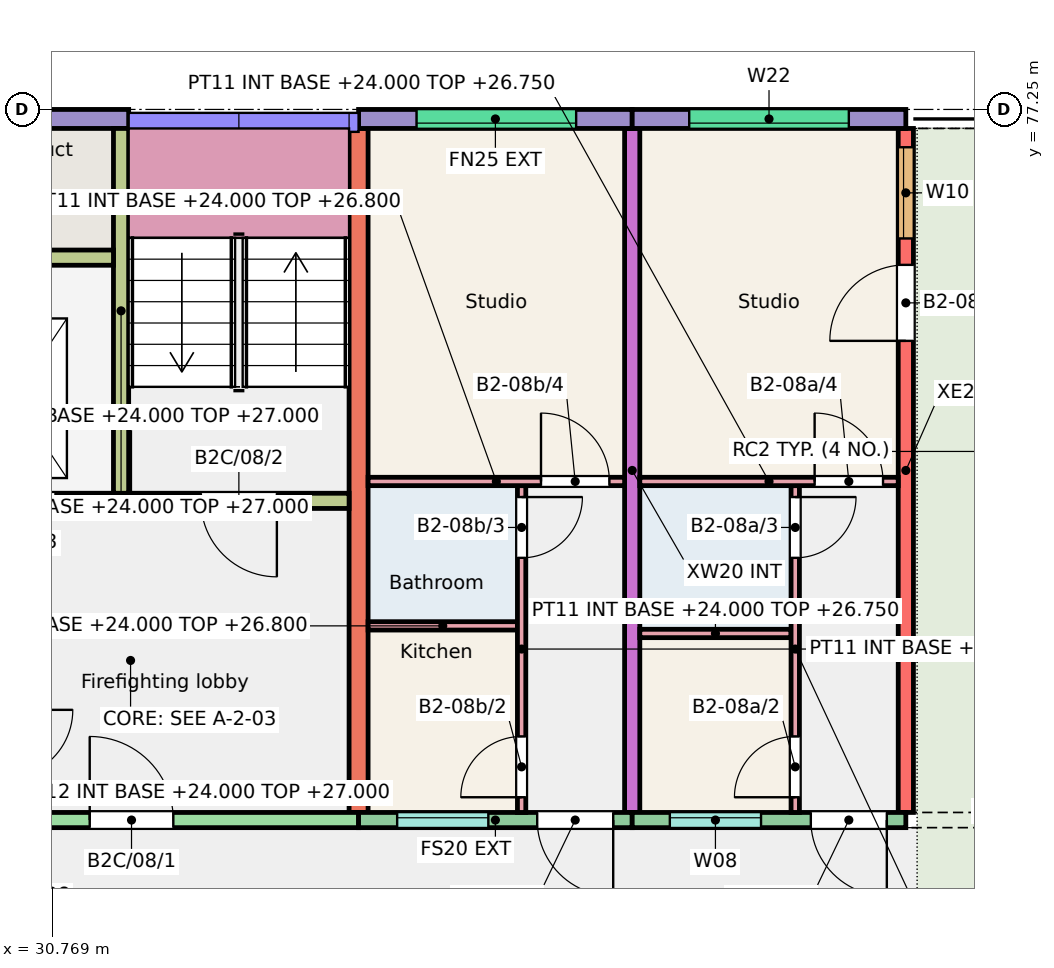
"""IFC4 building model, lengths in metres.
Left out: names, types, materials, properties, quantities, classifications, styles, units other than length and angle.
Written with IfcOpenShell. Run it as: python <this file> out.ifc"""

import sys

from ifc_helpers import new_model, si_unit, direction, frame, frame_2d, origin, place, context, subcontext, project, spatial, rectangle, extrude, element, fill, save


model = new_model("IFC4")
c1 = context("Model", 3, precision=1e-05, world=origin(), true_north=direction((0.0, 1.0)))
c2 = subcontext(c1, "Body", "Model", "MODEL_VIEW")
j1 = project(units=[si_unit("LENGTHUNIT", "METRE"), si_unit("PLANEANGLEUNIT", "RADIAN")], contexts=[c1])
p1 = place(None, origin())
s1 = spatial("IfcSite", under=j1, at=p1, CompositionType="ELEMENT")
p2 = place(p1, origin())
s2 = spatial("IfcBuilding", under=s1, at=p2, CompositionType="ELEMENT")
p3 = place(p2, frame((0.0, 0.0, 24.0)))
s3 = spatial("IfcBuildingStorey", under=s2, at=p3, CompositionType="ELEMENT", Elevation=24.0)
p4 = place(p3, frame((34.8, 68.0, 0.0), z_axis=(0.0, 0.0, 1.0), x_axis=(0.0, 1.0, 0.0)))
e1 = element("IfcWall", 1, at=p4, inside=s3, PredefinedType="SHEAR", context=c2, shape_type="SweptSolid", body=[
    extrude(rectangle(XDim=9.0, YDim=0.25, at=frame_2d((4.5, 0.0))), origin(), (0.0, 0.0, 1.0), 3.0),
])
p5 = place(p3, frame((38.4, 68.0, 0.0), z_axis=(0.0, 0.0, 1.0), x_axis=(0.0, 1.0, 0.0)))
e2 = element("IfcWall", 2, at=p5, inside=s3, PredefinedType="SHEAR", context=c2, shape_type="SweptSolid", body=[
    extrude(rectangle(XDim=9.0, YDim=0.2, at=frame_2d((4.5, 0.0))), origin(), (0.0, 0.0, 1.0), 3.0),
])
p6 = place(p3, frame((42.0, 68.0, 0.0), z_axis=(0.0, 0.0, 1.0), x_axis=(0.0, 1.0, 0.0)))
e3 = element("IfcWall", 3, at=p6, inside=s3, PredefinedType="SHEAR", context=c2, shape_type="SweptSolid", body=[
    extrude(rectangle(XDim=9.0, YDim=0.2, at=frame_2d((4.5, 0.0))), origin(), (0.0, 0.0, 1.0), 3.0),
])
p7 = place(p6, frame((7.552, 0.0, 0.9)))
e4 = element("IfcOpeningElement", 4, at=p7, cuts=e3, PredefinedType="OPENING", context=c2, shape_type="SweptSolid", body=[
    extrude(rectangle(XDim=1.2, YDim=1.5, at=frame_2d((0.6, 0.75))), frame((0.0, 0.11, 0.0), z_axis=(0.0, -1.0, 0.0), x_axis=(1.0, 0.0, 0.0)), (0.0, 0.0, 1.0), 0.22),
])
p8 = place(p6, frame((6.205, 0.0, 0.0)))
e5 = element("IfcOpeningElement", 5, at=p8, cuts=e3, PredefinedType="OPENING", context=c2, shape_type="SweptSolid", body=[
    extrude(rectangle(XDim=1.0, YDim=2.1, at=frame_2d((0.5, 1.05))), frame((0.0, 0.11, 0.0), z_axis=(0.0, -1.0, 0.0), x_axis=(1.0, 0.0, 0.0)), (0.0, 0.0, 1.0), 0.22),
])
p9 = place(p3, frame((28.8, 77.125, 0.0), z_axis=(0.0, 0.0, 1.0), x_axis=(1.0, 0.0, 0.0)))
e6 = element("IfcWall", 6, at=p9, inside=s3, PredefinedType="SOLIDWALL", context=c2, shape_type="SweptSolid", body=[
    extrude(rectangle(XDim=2.975, YDim=0.25, at=frame_2d((1.487, 0.0))), origin(), (0.0, 0.0, 1.0), 3.0),
])
p10 = place(p3, frame((28.95, 67.9, 0.0), z_axis=(0.0, 0.0, 1.0), x_axis=(1.0, 0.0, 0.0)))
e7 = element("IfcWall", 7, at=p10, inside=s3, PredefinedType="SHEAR", context=c2, shape_type="SweptSolid", body=[
    extrude(rectangle(XDim=5.85, YDim=0.2, at=frame_2d((2.925, 0.0))), origin(), (0.0, 0.0, 1.0), 3.0),
])
p11 = place(p10, frame((2.312, 0.0, 0.0)))
e8 = element("IfcOpeningElement", 8, at=p11, cuts=e7, PredefinedType="OPENING", context=c2, shape_type="SweptSolid", body=[
    extrude(rectangle(XDim=1.1, YDim=2.1, at=frame_2d((0.55, 1.05))), frame((0.0, 0.11, 0.0), z_axis=(0.0, -1.0, 0.0), x_axis=(1.0, 0.0, 0.0)), (0.0, 0.0, 1.0), 0.22),
])
p12 = place(p3, frame((28.95, 72.1, 0.0), z_axis=(0.0, 0.0, 1.0), x_axis=(1.0, 0.0, 0.0)))
e9 = element("IfcWall", 9, at=p12, inside=s3, PredefinedType="SHEAR", context=c2, shape_type="SweptSolid", body=[
    extrude(rectangle(XDim=5.725, YDim=0.2, at=frame_2d((2.863, 0.0))), origin(), (0.0, 0.0, 1.0), 3.0),
])
p13 = place(p12, frame((3.775, 0.0, 0.0)))
e10 = element("IfcOpeningElement", 10, at=p13, cuts=e9, PredefinedType="OPENING", context=c2, shape_type="SweptSolid", body=[
    extrude(rectangle(XDim=1.0, YDim=2.1, at=frame_2d((0.5, 1.05))), frame((0.0, 0.11, 0.0), z_axis=(0.0, -1.0, 0.0), x_axis=(1.0, 0.0, 0.0)), (0.0, 0.0, 1.0), 0.22),
])
p14 = place(p12, frame((0.762, 0.0, 0.0)))
e11 = element("IfcOpeningElement", 11, at=p14, cuts=e9, PredefinedType="OPENING", context=c2, shape_type="SweptSolid", body=[
    extrude(rectangle(XDim=1.1, YDim=2.1, at=frame_2d((0.55, 1.05))), frame((0.0, 0.11, 0.0), z_axis=(0.0, -1.0, 0.0), x_axis=(1.0, 0.0, 0.0)), (0.0, 0.0, 1.0), 0.22),
])
p15 = place(p3, frame((31.675, 72.2, 0.0), z_axis=(0.0, 0.0, 1.0), x_axis=(0.0, 1.0, 0.0)))
e12 = element("IfcWall", 12, at=p15, inside=s3, PredefinedType="SHEAR", context=c2, shape_type="SweptSolid", body=[
    extrude(rectangle(XDim=4.8, YDim=0.2, at=frame_2d((2.4, 0.0))), origin(), (0.0, 0.0, 1.0), 3.0),
])
p16 = place(p3, frame((28.95, 75.3, 0.0), z_axis=(0.0, 0.0, 1.0), x_axis=(1.0, 0.0, 0.0)))
e13 = element("IfcWall", 13, at=p16, inside=s3, PredefinedType="SHEAR", context=c2, shape_type="SweptSolid", body=[
    extrude(rectangle(XDim=2.625, YDim=0.2, at=frame_2d((1.312, 0.0))), origin(), (0.0, 0.0, 1.0), 3.0),
])
p17 = place(p3, frame((34.8, 77.125, 0.0), z_axis=(0.0, 0.0, 1.0), x_axis=(1.0, 0.0, 0.0)))
e14 = element("IfcWall", 14, at=p17, inside=s3, PredefinedType="SOLIDWALL", context=c2, shape_type="SweptSolid", body=[
    extrude(rectangle(XDim=3.6, YDim=0.25, at=frame_2d((1.8, 0.0))), origin(), (0.0, 0.0, 1.0), 3.0),
])
p18 = place(p17, frame((0.762, 0.0, 1.2)))
e15 = element("IfcOpeningElement", 15, at=p18, cuts=e14, PredefinedType="OPENING", context=c2, shape_type="SweptSolid", body=[
    extrude(rectangle(XDim=2.1, YDim=1.2, at=frame_2d((1.05, 0.6))), frame((0.0, 0.135, 0.0), z_axis=(0.0, -1.0, 0.0), x_axis=(1.0, 0.0, 0.0)), (0.0, 0.0, 1.0), 0.27),
])
p19 = place(p3, frame((34.8, 67.9, 0.0), z_axis=(0.0, 0.0, 1.0), x_axis=(1.0, 0.0, 0.0)))
e16 = element("IfcWall", 16, at=p19, inside=s3, PredefinedType="SOLIDWALL", context=c2, shape_type="SweptSolid", body=[
    extrude(rectangle(XDim=3.6, YDim=0.2, at=frame_2d((1.8, 0.0))), origin(), (0.0, 0.0, 1.0), 3.0),
])
p20 = place(p19, frame((0.508, 0.0, 1.1)))
e17 = element("IfcOpeningElement", 17, at=p20, cuts=e16, PredefinedType="OPENING", context=c2, shape_type="SweptSolid", body=[
    extrude(rectangle(XDim=1.2, YDim=1.3, at=frame_2d((0.6, 0.65))), frame((0.0, 0.11, 0.0), z_axis=(0.0, -1.0, 0.0), x_axis=(1.0, 0.0, 0.0)), (0.0, 0.0, 1.0), 0.22),
])
p21 = place(p19, frame((2.35, 0.0, 0.0)))
e18 = element("IfcOpeningElement", 18, at=p21, cuts=e16, PredefinedType="OPENING", context=c2, shape_type="SweptSolid", body=[
    extrude(rectangle(XDim=1.0, YDim=2.1, at=frame_2d((0.5, 1.05))), frame((0.0, 0.11, 0.0), z_axis=(0.0, -1.0, 0.0), x_axis=(1.0, 0.0, 0.0)), (0.0, 0.0, 1.0), 0.22),
])
p22 = place(p3, frame((38.4, 77.125, 0.0), z_axis=(0.0, 0.0, 1.0), x_axis=(1.0, 0.0, 0.0)))
e19 = element("IfcWall", 19, at=p22, inside=s3, PredefinedType="SOLIDWALL", context=c2, shape_type="SweptSolid", body=[
    extrude(rectangle(XDim=3.6, YDim=0.25, at=frame_2d((1.8, 0.0))), origin(), (0.0, 0.0, 1.0), 3.0),
])
p23 = place(p22, frame((0.75, 0.0, 1.2)))
e20 = element("IfcOpeningElement", 20, at=p23, cuts=e19, PredefinedType="OPENING", context=c2, shape_type="SweptSolid", body=[
    extrude(rectangle(XDim=2.1, YDim=1.2, at=frame_2d((1.05, 0.6))), frame((0.0, 0.135, 0.0), z_axis=(0.0, -1.0, 0.0), x_axis=(1.0, 0.0, 0.0)), (0.0, 0.0, 1.0), 0.27),
])
p24 = place(p3, frame((38.4, 67.9, 0.0), z_axis=(0.0, 0.0, 1.0), x_axis=(1.0, 0.0, 0.0)))
e21 = element("IfcWall", 21, at=p24, inside=s3, PredefinedType="SOLIDWALL", context=c2, shape_type="SweptSolid", body=[
    extrude(rectangle(XDim=3.6, YDim=0.2, at=frame_2d((1.8, 0.0))), origin(), (0.0, 0.0, 1.0), 3.0),
])
p25 = place(p24, frame((0.495, 0.0, 1.1)))
e22 = element("IfcOpeningElement", 22, at=p25, cuts=e21, PredefinedType="OPENING", context=c2, shape_type="SweptSolid", body=[
    extrude(rectangle(XDim=1.2, YDim=1.3, at=frame_2d((0.6, 0.65))), frame((0.0, 0.11, 0.0), z_axis=(0.0, -1.0, 0.0), x_axis=(1.0, 0.0, 0.0)), (0.0, 0.0, 1.0), 0.22),
])
p26 = place(p24, frame((2.35, 0.0, 0.0)))
e23 = element("IfcOpeningElement", 23, at=p26, cuts=e21, PredefinedType="OPENING", context=c2, shape_type="SweptSolid", body=[
    extrude(rectangle(XDim=1.0, YDim=2.1, at=frame_2d((0.5, 1.05))), frame((0.0, 0.11, 0.0), z_axis=(0.0, -1.0, 0.0), x_axis=(1.0, 0.0, 0.0)), (0.0, 0.0, 1.0), 0.22),
])
p27 = place(p3, frame((38.5, 70.355, 0.0), z_axis=(0.0, 0.0, 1.0), x_axis=(1.0, 0.0, 0.0)))
e24 = element("IfcWall", 24, at=p27, inside=s3, PredefinedType="PARTITIONING", context=c2, shape_type="SweptSolid", body=[
    extrude(rectangle(XDim=1.99, YDim=0.11, at=frame_2d((0.995, 0.0))), origin(), (0.0, 0.0, 1.0), 2.75),
])
p28 = place(p3, frame((40.545, 68.0, 0.0), z_axis=(0.0, 0.0, 1.0), x_axis=(0.0, 1.0, 0.0)))
e25 = element("IfcWall", 25, at=p28, inside=s3, PredefinedType="PARTITIONING", context=c2, shape_type="SweptSolid", body=[
    extrude(rectangle(XDim=4.3, YDim=0.11, at=frame_2d((2.15, 0.0))), origin(), (0.0, 0.0, 1.0), 2.75),
])
p29 = place(p28, frame((0.2, 0.0, 0.0)))
e26 = element("IfcOpeningElement", 26, at=p29, cuts=e25, PredefinedType="OPENING", context=c2, shape_type="SweptSolid", body=[
    extrude(rectangle(XDim=0.8, YDim=2.1, at=frame_2d((0.4, 1.05))), frame((0.0, 0.065, 0.0), z_axis=(0.0, -1.0, 0.0), x_axis=(1.0, 0.0, 0.0)), (0.0, 0.0, 1.0), 0.13),
])
p30 = place(p28, frame((3.35, 0.0, 0.0)))
e27 = element("IfcOpeningElement", 27, at=p30, cuts=e25, PredefinedType="OPENING", context=c2, shape_type="SweptSolid", body=[
    extrude(rectangle(XDim=0.8, YDim=2.1, at=frame_2d((0.4, 1.05))), frame((0.0, 0.065, 0.0), z_axis=(0.0, -1.0, 0.0), x_axis=(1.0, 0.0, 0.0)), (0.0, 0.0, 1.0), 0.13),
])
p31 = place(p3, frame((38.5, 72.355, 0.0), z_axis=(0.0, 0.0, 1.0), x_axis=(1.0, 0.0, 0.0)))
e28 = element("IfcWall", 28, at=p31, inside=s3, PredefinedType="PARTITIONING", context=c2, shape_type="SweptSolid", body=[
    extrude(rectangle(XDim=3.4, YDim=0.11, at=frame_2d((1.7, 0.0))), origin(), (0.0, 0.0, 1.0), 2.75),
])
p32 = place(p31, frame((2.3, 0.0, 0.0)))
e29 = element("IfcOpeningElement", 29, at=p32, cuts=e28, PredefinedType="OPENING", context=c2, shape_type="SweptSolid", body=[
    extrude(rectangle(XDim=0.9, YDim=2.1, at=frame_2d((0.45, 1.05))), frame((0.0, 0.065, 0.0), z_axis=(0.0, -1.0, 0.0), x_axis=(1.0, 0.0, 0.0)), (0.0, 0.0, 1.0), 0.13),
])
p33 = place(p3, frame((34.925, 70.455, 0.0), z_axis=(0.0, 0.0, 1.0), x_axis=(1.0, 0.0, 0.0)))
e30 = element("IfcWall", 30, at=p33, inside=s3, PredefinedType="PARTITIONING", context=c2, shape_type="SweptSolid", body=[
    extrude(rectangle(XDim=1.965, YDim=0.11, at=frame_2d((0.982, 0.0))), origin(), (0.0, 0.0, 1.0), 2.8),
])
p34 = place(p3, frame((36.945, 68.0, 0.0), z_axis=(0.0, 0.0, 1.0), x_axis=(0.0, 1.0, 0.0)))
e31 = element("IfcWall", 31, at=p34, inside=s3, PredefinedType="PARTITIONING", context=c2, shape_type="SweptSolid", body=[
    extrude(rectangle(XDim=4.3, YDim=0.11, at=frame_2d((2.15, 0.0))), origin(), (0.0, 0.0, 1.0), 2.8),
])
p35 = place(p34, frame((0.2, 0.0, 0.0)))
e32 = element("IfcOpeningElement", 32, at=p35, cuts=e31, PredefinedType="OPENING", context=c2, shape_type="SweptSolid", body=[
    extrude(rectangle(XDim=0.8, YDim=2.1, at=frame_2d((0.4, 1.05))), frame((0.0, 0.065, 0.0), z_axis=(0.0, -1.0, 0.0), x_axis=(1.0, 0.0, 0.0)), (0.0, 0.0, 1.0), 0.13),
])
p36 = place(p34, frame((3.35, 0.0, 0.0)))
e33 = element("IfcOpeningElement", 33, at=p36, cuts=e31, PredefinedType="OPENING", context=c2, shape_type="SweptSolid", body=[
    extrude(rectangle(XDim=0.8, YDim=2.1, at=frame_2d((0.4, 1.05))), frame((0.0, 0.065, 0.0), z_axis=(0.0, -1.0, 0.0), x_axis=(1.0, 0.0, 0.0)), (0.0, 0.0, 1.0), 0.13),
])
p37 = place(p3, frame((34.925, 72.355, 0.0), z_axis=(0.0, 0.0, 1.0), x_axis=(1.0, 0.0, 0.0)))
e34 = element("IfcWall", 34, at=p37, inside=s3, PredefinedType="PARTITIONING", context=c2, shape_type="SweptSolid", body=[
    extrude(rectangle(XDim=3.375, YDim=0.11, at=frame_2d((1.688, 0.0))), origin(), (0.0, 0.0, 1.0), 2.8),
])
p38 = place(p37, frame((2.275, 0.0, 0.0)))
e35 = element("IfcOpeningElement", 35, at=p38, cuts=e34, PredefinedType="OPENING", context=c2, shape_type="SweptSolid", body=[
    extrude(rectangle(XDim=0.9, YDim=2.1, at=frame_2d((0.45, 1.05))), frame((0.0, 0.065, 0.0), z_axis=(0.0, -1.0, 0.0), x_axis=(1.0, 0.0, 0.0)), (0.0, 0.0, 1.0), 0.13),
])
p39 = place(p25, origin())
e36 = element("IfcWindow", 36, at=p39, inside=s3, PartitioningType="SINGLE_PANEL", PredefinedType="WINDOW", context=c2, shape_type="SweptSolid", body=[
    extrude(rectangle(XDim=1.2, YDim=1.3, at=frame_2d((0.6, 0.65))), frame((0.0, 0.06, 0.0), z_axis=(0.0, -1.0, 0.0), x_axis=(1.0, 0.0, 0.0)), (0.0, 0.0, 1.0), 0.06),
])
fill(e22, e36)
p40 = place(p23, origin())
e37 = element("IfcWindow", 37, at=p40, inside=s3, PartitioningType="SINGLE_PANEL", PredefinedType="WINDOW", context=c2, shape_type="SweptSolid", body=[
    extrude(rectangle(XDim=2.1, YDim=1.2, at=frame_2d((1.05, 0.6))), frame((0.0, -0.025, 0.0), z_axis=(0.0, -1.0, 0.0), x_axis=(1.0, 0.0, 0.0)), (0.0, 0.0, 1.0), 0.06),
])
fill(e20, e37)
p41 = place(p7, origin())
e38 = element("IfcWindow", 38, at=p41, inside=s3, PartitioningType="SINGLE_PANEL", PredefinedType="WINDOW", context=c2, shape_type="SweptSolid", body=[
    extrude(rectangle(XDim=1.2, YDim=1.5, at=frame_2d((0.6, 0.75))), frame((0.0, 0.06, 0.0), z_axis=(0.0, -1.0, 0.0), x_axis=(1.0, 0.0, 0.0)), (0.0, 0.0, 1.0), 0.06),
])
fill(e4, e38)
p42 = place(p20, origin())
e39 = element("IfcWindow", 39, at=p42, inside=s3, PartitioningType="SINGLE_PANEL", PredefinedType="WINDOW", context=c2, shape_type="SweptSolid", body=[
    extrude(rectangle(XDim=1.2, YDim=1.3, at=frame_2d((0.6, 0.65))), frame((0.0, 0.06, 0.0), z_axis=(0.0, -1.0, 0.0), x_axis=(1.0, 0.0, 0.0)), (0.0, 0.0, 1.0), 0.06),
])
fill(e17, e39)
p43 = place(p18, origin())
e40 = element("IfcWindow", 40, at=p43, inside=s3, PartitioningType="SINGLE_PANEL", PredefinedType="WINDOW", context=c2, shape_type="SweptSolid", body=[
    extrude(rectangle(XDim=2.1, YDim=1.2, at=frame_2d((1.05, 0.6))), frame((0.0, -0.025, 0.0), z_axis=(0.0, -1.0, 0.0), x_axis=(1.0, 0.0, 0.0)), (0.0, 0.0, 1.0), 0.06),
])
fill(e15, e40)
p44 = place(p26, origin())
e41 = element("IfcDoor", 41, at=p44, inside=s3, OperationType="SINGLE_SWING_RIGHT", PredefinedType="DOOR", context=c2, shape_type="SweptSolid", body=[
    extrude(rectangle(XDim=1.0, YDim=2.1, at=frame_2d((0.5, 1.05))), frame((0.0, 0.025, 0.0), z_axis=(0.0, -1.0, 0.0), x_axis=(1.0, 0.0, 0.0)), (0.0, 0.0, 1.0), 0.05),
])
fill(e23, e41)
p45 = place(p29, origin())
e42 = element("IfcDoor", 42, at=p45, inside=s3, OperationType="SINGLE_SWING_LEFT", PredefinedType="DOOR", context=c2, shape_type="SweptSolid", body=[
    extrude(rectangle(XDim=0.8, YDim=2.1, at=frame_2d((0.4, 1.05))), frame((0.0, 0.025, 0.0), z_axis=(0.0, -1.0, 0.0), x_axis=(1.0, 0.0, 0.0)), (0.0, 0.0, 1.0), 0.05),
])
fill(e26, e42)
p46 = place(p30, origin())
e43 = element("IfcDoor", 43, at=p46, inside=s3, OperationType="SINGLE_SWING_RIGHT", PredefinedType="DOOR", context=c2, shape_type="SweptSolid", body=[
    extrude(rectangle(XDim=0.8, YDim=2.1, at=frame_2d((0.4, 1.05))), frame((0.0, 0.025, 0.0), z_axis=(0.0, -1.0, 0.0), x_axis=(1.0, 0.0, 0.0)), (0.0, 0.0, 1.0), 0.05),
])
fill(e27, e43)
p47 = place(p32, origin())
e44 = element("IfcDoor", 44, at=p47, inside=s3, OperationType="SINGLE_SWING_LEFT", PredefinedType="DOOR", context=c2, shape_type="SweptSolid", body=[
    extrude(rectangle(XDim=0.9, YDim=2.1, at=frame_2d((0.45, 1.05))), frame((0.0, 0.025, 0.0), z_axis=(0.0, -1.0, 0.0), x_axis=(1.0, 0.0, 0.0)), (0.0, 0.0, 1.0), 0.05),
])
fill(e29, e44)
p48 = place(p8, origin())
e45 = element("IfcDoor", 45, at=p48, inside=s3, OperationType="SINGLE_SWING_LEFT", PredefinedType="DOOR", context=c2, shape_type="SweptSolid", body=[
    extrude(rectangle(XDim=1.0, YDim=2.1, at=frame_2d((0.5, 1.05))), frame((0.0, 0.025, 0.0), z_axis=(0.0, -1.0, 0.0), x_axis=(1.0, 0.0, 0.0)), (0.0, 0.0, 1.0), 0.05),
])
fill(e5, e45)
p49 = place(p21, origin())
e46 = element("IfcDoor", 46, at=p49, inside=s3, OperationType="SINGLE_SWING_RIGHT", PredefinedType="DOOR", context=c2, shape_type="SweptSolid", body=[
    extrude(rectangle(XDim=1.0, YDim=2.1, at=frame_2d((0.5, 1.05))), frame((0.0, 0.025, 0.0), z_axis=(0.0, -1.0, 0.0), x_axis=(1.0, 0.0, 0.0)), (0.0, 0.0, 1.0), 0.05),
])
fill(e18, e46)
p50 = place(p35, origin())
e47 = element("IfcDoor", 47, at=p50, inside=s3, OperationType="SINGLE_SWING_LEFT", PredefinedType="DOOR", context=c2, shape_type="SweptSolid", body=[
    extrude(rectangle(XDim=0.8, YDim=2.1, at=frame_2d((0.4, 1.05))), frame((0.0, 0.025, 0.0), z_axis=(0.0, -1.0, 0.0), x_axis=(1.0, 0.0, 0.0)), (0.0, 0.0, 1.0), 0.05),
])
fill(e32, e47)
p51 = place(p36, origin())
e48 = element("IfcDoor", 48, at=p51, inside=s3, OperationType="SINGLE_SWING_RIGHT", PredefinedType="DOOR", context=c2, shape_type="SweptSolid", body=[
    extrude(rectangle(XDim=0.8, YDim=2.1, at=frame_2d((0.4, 1.05))), frame((0.0, 0.025, 0.0), z_axis=(0.0, -1.0, 0.0), x_axis=(1.0, 0.0, 0.0)), (0.0, 0.0, 1.0), 0.05),
])
fill(e33, e48)
p52 = place(p38, origin())
e49 = element("IfcDoor", 49, at=p52, inside=s3, OperationType="SINGLE_SWING_LEFT", PredefinedType="DOOR", context=c2, shape_type="SweptSolid", body=[
    extrude(rectangle(XDim=0.9, YDim=2.1, at=frame_2d((0.45, 1.05))), frame((0.0, 0.025, 0.0), z_axis=(0.0, -1.0, 0.0), x_axis=(1.0, 0.0, 0.0)), (0.0, 0.0, 1.0), 0.05),
])
fill(e35, e49)
p53 = place(p11, origin())
e50 = element("IfcDoor", 50, at=p53, inside=s3, OperationType="SINGLE_SWING_LEFT", PredefinedType="DOOR", context=c2, shape_type="SweptSolid", body=[
    extrude(rectangle(XDim=1.1, YDim=2.1, at=frame_2d((0.55, 1.05))), frame((0.0, 0.025, 0.0), z_axis=(0.0, -1.0, 0.0), x_axis=(1.0, 0.0, 0.0)), (0.0, 0.0, 1.0), 0.05),
])
fill(e8, e50)
p54 = place(p13, origin())
e51 = element("IfcDoor", 51, at=p54, inside=s3, OperationType="SINGLE_SWING_RIGHT", PredefinedType="DOOR", context=c2, shape_type="SweptSolid", body=[
    extrude(rectangle(XDim=1.0, YDim=2.1, at=frame_2d((0.5, 1.05))), frame((0.0, 0.025, 0.0), z_axis=(0.0, -1.0, 0.0), x_axis=(1.0, 0.0, 0.0)), (0.0, 0.0, 1.0), 0.05),
])
fill(e10, e51)
p55 = place(p14, origin())
e52 = element("IfcDoor", 52, at=p55, inside=s3, OperationType="DOUBLE_DOOR_SLIDING", PredefinedType="DOOR", context=c2, shape_type="SweptSolid", body=[
    extrude(rectangle(XDim=1.1, YDim=2.1, at=frame_2d((0.55, 1.05))), frame((0.0, 0.025, 0.0), z_axis=(0.0, -1.0, 0.0), x_axis=(1.0, 0.0, 0.0)), (0.0, 0.0, 1.0), 0.05),
])
fill(e11, e52)
save(model, sys.argv[1])
